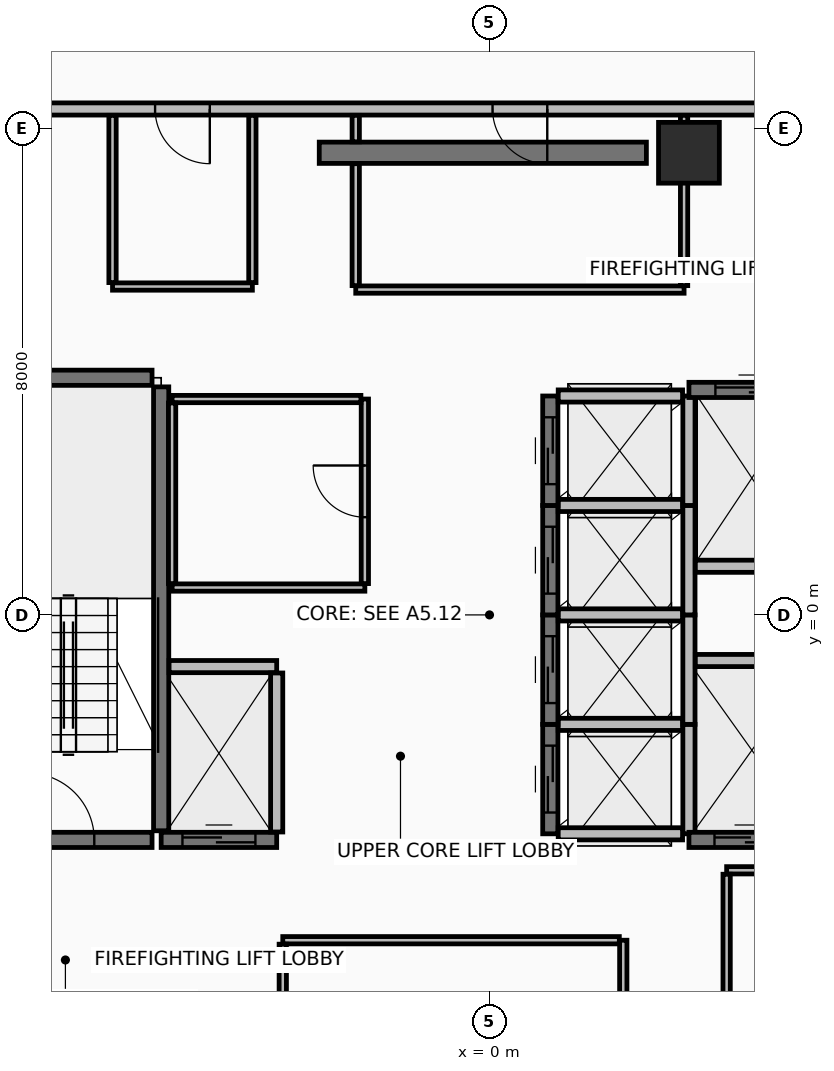
"""IFC4 building model, lengths in metres.
Left out: names, types, materials, properties, quantities, classifications, styles, units other than length and angle.
Written with IfcOpenShell. Run it as: python <this file> out.ifc"""

import sys

from ifc_helpers import new_model, si_unit, direction, frame, frame_2d, origin, origin_2d, place, context, subcontext, project, spatial, rectangle, extrude, element, fill, save


model = new_model("IFC4")
c1 = context("Model", 3, precision=1e-05, world=origin(), true_north=direction((0.0, 1.0)))
c2 = subcontext(c1, "Body", "Model", "MODEL_VIEW")
j1 = project(units=[si_unit("LENGTHUNIT", "METRE"), si_unit("PLANEANGLEUNIT", "RADIAN")], contexts=[c1])
p1 = place(None, origin())
s1 = spatial("IfcSite", under=j1, at=p1, CompositionType="ELEMENT")
p2 = place(p1, origin())
s2 = spatial("IfcBuilding", under=s1, at=p2, CompositionType="ELEMENT")
p3 = place(p2, frame((0.0, 0.0, 245.05)))
s3 = spatial("IfcBuildingStorey", under=s2, at=p3, CompositionType="ELEMENT", Elevation=245.05)
p4 = place(p3, frame((3.28, 7.6, 0.0), z_axis=(0.0, 0.0, 1.0), x_axis=(1.0, 0.0, 0.0)))
e1 = element("IfcColumn", 1, at=p4, inside=s3, PredefinedType="COLUMN", context=c2, shape_type="SweptSolid", body=[
    extrude(rectangle(XDim=1.0, YDim=1.0, at=origin_2d()), origin(), (0.0, 0.0, 1.0), 3.6),
])
p5 = place(p3, frame((-2.8, 7.6, 0.0), z_axis=(0.0, 0.0, 1.0), x_axis=(1.0, 0.0, 0.0)))
e2 = element("IfcWall", 2, at=p5, inside=s3, PredefinedType="SHEAR", context=c2, shape_type="SweptSolid", body=[
    extrude(rectangle(XDim=5.38, YDim=0.35, at=frame_2d((2.69, 0.0))), origin(), (0.0, 0.0, 1.0), 3.42),
])
p6 = place(p3, frame((9.62, 8.32, 0.0), z_axis=(0.0, 0.0, 1.0), x_axis=(-1.0, 0.0, 0.0)))
e3 = element("IfcWall", 3, at=p6, inside=s3, PredefinedType="PARTITIONING", context=c2, shape_type="SweptSolid", body=[
    extrude(rectangle(XDim=19.24, YDim=0.2, at=frame_2d((9.62, 0.0))), origin(), (0.0, 0.0, 1.0), 2.915),
])
p7 = place(p6, frame((8.67, 0.0, 0.0)))
e4 = element("IfcOpeningElement", 4, at=p7, cuts=e3, PredefinedType="OPENING", context=c2, shape_type="SweptSolid", body=[
    extrude(rectangle(XDim=0.9, YDim=2.1, at=frame_2d((0.45, 1.05))), frame((0.0, 0.11, 0.0), z_axis=(0.0, -1.0, 0.0), x_axis=(1.0, 0.0, 0.0)), (0.0, 0.0, 1.0), 0.22),
])
p8 = place(p6, frame((14.22, 0.0, 0.0)))
e5 = element("IfcOpeningElement", 5, at=p8, cuts=e3, PredefinedType="OPENING", context=c2, shape_type="SweptSolid", body=[
    extrude(rectangle(XDim=0.9, YDim=2.1, at=frame_2d((0.45, 1.05))), frame((0.0, 0.11, 0.0), z_axis=(0.0, -1.0, 0.0), x_axis=(1.0, 0.0, 0.0)), (0.0, 0.0, 1.0), 0.22),
])
p9 = place(p3, frame((-5.4, -3.55, 0.0), z_axis=(0.0, 0.0, 1.0), x_axis=(0.0, 1.0, 0.0)))
e6 = element("IfcWall", 6, at=p9, inside=s3, PredefinedType="SHEAR", context=c2, shape_type="SweptSolid", body=[
    extrude(rectangle(XDim=7.3, YDim=0.25, at=frame_2d((3.65, 0.0))), origin(), (0.0, 0.0, 1.0), 3.42),
])
p10 = place(p3, frame((-8.5, -3.7, 0.0), z_axis=(0.0, 0.0, 1.0), x_axis=(1.0, 0.0, 0.0)))
e7 = element("IfcWall", 7, at=p10, inside=s3, PredefinedType="SHEAR", context=c2, shape_type="SweptSolid", body=[
    extrude(rectangle(XDim=2.95, YDim=0.25, at=frame_2d((1.475, 0.0))), origin(), (0.0, 0.0, 1.0), 3.42),
])
p11 = place(p10, frame((0.9, 0.0, 0.0)))
e8 = element("IfcOpeningElement", 8, at=p11, cuts=e7, PredefinedType="OPENING", context=c2, shape_type="SweptSolid", body=[
    extrude(rectangle(XDim=1.1, YDim=2.15, at=frame_2d((0.55, 1.075))), frame((0.0, 0.135, 0.0), z_axis=(0.0, -1.0, 0.0), x_axis=(1.0, 0.0, 0.0)), (0.0, 0.0, 1.0), 0.27),
])
p12 = place(p3, frame((-8.5, 3.9, 0.0), z_axis=(0.0, 0.0, 1.0), x_axis=(1.0, 0.0, 0.0)))
e9 = element("IfcWall", 9, at=p12, inside=s3, PredefinedType="SHEAR", context=c2, shape_type="SweptSolid", body=[
    extrude(rectangle(XDim=2.95, YDim=0.25, at=frame_2d((1.475, 0.0))), origin(), (0.0, 0.0, 1.0), 3.42),
])
p13 = place(p3, frame((1.0, -3.6, 0.0), z_axis=(0.0, 0.0, 1.0), x_axis=(0.0, 1.0, 0.0)))
e10 = element("IfcWall", 10, at=p13, inside=s3, PredefinedType="SHEAR", context=c2, shape_type="SweptSolid", body=[
    extrude(rectangle(XDim=1.8, YDim=0.25, at=frame_2d((0.9, 0.0))), origin(), (0.0, 0.0, 1.0), 3.42),
])
p14 = place(p13, frame((0.35, 0.0, 0.0)))
e11 = element("IfcOpeningElement", 11, at=p14, cuts=e10, PredefinedType="OPENING", context=c2, shape_type="SweptSolid", body=[
    extrude(rectangle(XDim=1.1, YDim=2.2, at=frame_2d((0.55, 1.1))), frame((0.0, 0.135, 0.0), z_axis=(0.0, -1.0, 0.0), x_axis=(1.0, 0.0, 0.0)), (0.0, 0.0, 1.0), 0.27),
])
p15 = place(p3, frame((3.28, -3.6, 0.0), z_axis=(0.0, 0.0, 1.0), x_axis=(0.0, 1.0, 0.0)))
e12 = element("IfcWall", 12, at=p15, inside=s3, PredefinedType="PARTITIONING", context=c2, shape_type="SweptSolid", body=[
    extrude(rectangle(XDim=1.8, YDim=0.2, at=frame_2d((0.9, 0.0))), origin(), (0.0, 0.0, 1.0), 3.42),
])
for number, where, z_axis, x_axis in (
    (13, (1.13, -3.6, 0.0), (0.0, 0.0, 1.0), (1.0, 0.0, 0.0)),
    (14, (1.13, -1.8, 0.0), (0.0, 0.0, 1.0), (1.0, 0.0, 0.0)),
):
    element("IfcWall", number, at=place(p3, frame(where, z_axis=z_axis, x_axis=x_axis)), inside=s3, PredefinedType="PARTITIONING", context=c2, shape_type="SweptSolid", body=[
        extrude(rectangle(XDim=2.045, YDim=0.2, at=frame_2d((1.022, 0.0))), origin(), (0.0, 0.0, 1.0), 3.42),
    ])
p16 = place(p3, frame((1.0, -1.8, 0.0), z_axis=(0.0, 0.0, 1.0), x_axis=(0.0, 1.0, 0.0)))
e15 = element("IfcWall", 15, at=p16, inside=s3, PredefinedType="SHEAR", context=c2, shape_type="SweptSolid", body=[
    extrude(rectangle(XDim=1.8, YDim=0.25, at=frame_2d((0.9, 0.0))), origin(), (0.0, 0.0, 1.0), 3.42),
])
p17 = place(p16, frame((0.35, 0.0, 0.0)))
e16 = element("IfcOpeningElement", 16, at=p17, cuts=e15, PredefinedType="OPENING", context=c2, shape_type="SweptSolid", body=[
    extrude(rectangle(XDim=1.1, YDim=2.2, at=frame_2d((0.55, 1.1))), frame((0.0, 0.135, 0.0), z_axis=(0.0, -1.0, 0.0), x_axis=(1.0, 0.0, 0.0)), (0.0, 0.0, 1.0), 0.27),
])
p18 = place(p3, frame((3.28, -1.8, 0.0), z_axis=(0.0, 0.0, 1.0), x_axis=(0.0, 1.0, 0.0)))
e17 = element("IfcWall", 17, at=p18, inside=s3, PredefinedType="PARTITIONING", context=c2, shape_type="SweptSolid", body=[
    extrude(rectangle(XDim=1.8, YDim=0.2, at=frame_2d((0.9, 0.0))), origin(), (0.0, 0.0, 1.0), 3.42),
])
p19 = place(p3, frame((1.13, 0.0, 0.0), z_axis=(0.0, 0.0, 1.0), x_axis=(1.0, 0.0, 0.0)))
e18 = element("IfcWall", 18, at=p19, inside=s3, PredefinedType="PARTITIONING", context=c2, shape_type="SweptSolid", body=[
    extrude(rectangle(XDim=2.045, YDim=0.2, at=frame_2d((1.022, 0.0))), origin(), (0.0, 0.0, 1.0), 3.42),
])
p20 = place(p3, frame((1.0, 0.0, 0.0), z_axis=(0.0, 0.0, 1.0), x_axis=(0.0, 1.0, 0.0)))
e19 = element("IfcWall", 19, at=p20, inside=s3, PredefinedType="SHEAR", context=c2, shape_type="SweptSolid", body=[
    extrude(rectangle(XDim=1.8, YDim=0.25, at=frame_2d((0.9, 0.0))), origin(), (0.0, 0.0, 1.0), 3.42),
])
p21 = place(p20, frame((0.35, 0.0, 0.0)))
e20 = element("IfcOpeningElement", 20, at=p21, cuts=e19, PredefinedType="OPENING", context=c2, shape_type="SweptSolid", body=[
    extrude(rectangle(XDim=1.1, YDim=2.2, at=frame_2d((0.55, 1.1))), frame((0.0, 0.135, 0.0), z_axis=(0.0, -1.0, 0.0), x_axis=(1.0, 0.0, 0.0)), (0.0, 0.0, 1.0), 0.27),
])
p22 = place(p3, frame((3.28, 0.0, 0.0), z_axis=(0.0, 0.0, 1.0), x_axis=(0.0, 1.0, 0.0)))
e21 = element("IfcWall", 21, at=p22, inside=s3, PredefinedType="PARTITIONING", context=c2, shape_type="SweptSolid", body=[
    extrude(rectangle(XDim=1.8, YDim=0.2, at=frame_2d((0.9, 0.0))), origin(), (0.0, 0.0, 1.0), 3.42),
])
p23 = place(p3, frame((1.13, 1.8, 0.0), z_axis=(0.0, 0.0, 1.0), x_axis=(1.0, 0.0, 0.0)))
e22 = element("IfcWall", 22, at=p23, inside=s3, PredefinedType="PARTITIONING", context=c2, shape_type="SweptSolid", body=[
    extrude(rectangle(XDim=2.045, YDim=0.2, at=frame_2d((1.022, 0.0))), origin(), (0.0, 0.0, 1.0), 3.42),
])
p24 = place(p3, frame((1.0, 1.8, 0.0), z_axis=(0.0, 0.0, 1.0), x_axis=(0.0, 1.0, 0.0)))
e23 = element("IfcWall", 23, at=p24, inside=s3, PredefinedType="SHEAR", context=c2, shape_type="SweptSolid", body=[
    extrude(rectangle(XDim=1.8, YDim=0.25, at=frame_2d((0.9, 0.0))), origin(), (0.0, 0.0, 1.0), 3.42),
])
p25 = place(p24, frame((0.35, 0.0, 0.0)))
e24 = element("IfcOpeningElement", 24, at=p25, cuts=e23, PredefinedType="OPENING", context=c2, shape_type="SweptSolid", body=[
    extrude(rectangle(XDim=1.1, YDim=2.2, at=frame_2d((0.55, 1.1))), frame((0.0, 0.135, 0.0), z_axis=(0.0, -1.0, 0.0), x_axis=(1.0, 0.0, 0.0)), (0.0, 0.0, 1.0), 0.27),
])
p26 = place(p3, frame((3.28, 1.8, 0.0), z_axis=(0.0, 0.0, 1.0), x_axis=(0.0, 1.0, 0.0)))
e25 = element("IfcWall", 25, at=p26, inside=s3, PredefinedType="PARTITIONING", context=c2, shape_type="SweptSolid", body=[
    extrude(rectangle(XDim=1.8, YDim=0.2, at=frame_2d((0.9, 0.0))), origin(), (0.0, 0.0, 1.0), 3.42),
])
p27 = place(p3, frame((1.13, 3.6, 0.0), z_axis=(0.0, 0.0, 1.0), x_axis=(1.0, 0.0, 0.0)))
e26 = element("IfcWall", 26, at=p27, inside=s3, PredefinedType="PARTITIONING", context=c2, shape_type="SweptSolid", body=[
    extrude(rectangle(XDim=2.045, YDim=0.2, at=frame_2d((1.022, 0.0))), origin(), (0.0, 0.0, 1.0), 2.715),
])
p28 = place(p3, frame((-5.4, -3.7, 0.0), z_axis=(0.0, 0.0, 1.0), x_axis=(1.0, 0.0, 0.0)))
e27 = element("IfcWall", 27, at=p28, inside=s3, PredefinedType="SHEAR", context=c2, shape_type="SweptSolid", body=[
    extrude(rectangle(XDim=1.9, YDim=0.25, at=frame_2d((0.95, 0.0))), origin(), (0.0, 0.0, 1.0), 3.42),
])
p29 = place(p28, frame((0.35, 0.0, 0.0)))
e28 = element("IfcOpeningElement", 28, at=p29, cuts=e27, PredefinedType="OPENING", context=c2, shape_type="SweptSolid", body=[
    extrude(rectangle(XDim=1.2, YDim=2.2, at=frame_2d((0.6, 1.1))), frame((0.0, 0.135, 0.0), z_axis=(0.0, -1.0, 0.0), x_axis=(1.0, 0.0, 0.0)), (0.0, 0.0, 1.0), 0.27),
])
p30 = place(p3, frame((-5.27, -0.85, 0.0), z_axis=(0.0, 0.0, 1.0), x_axis=(1.0, 0.0, 0.0)))
e29 = element("IfcWall", 29, at=p30, inside=s3, PredefinedType="PARTITIONING", context=c2, shape_type="SweptSolid", body=[
    extrude(rectangle(XDim=1.77, YDim=0.2, at=frame_2d((0.885, 0.0))), origin(), (0.0, 0.0, 1.0), 3.42),
])
p31 = place(p3, frame((-3.5, -3.57, 0.0), z_axis=(0.0, 0.0, 1.0), x_axis=(0.0, 1.0, 0.0)))
e30 = element("IfcWall", 30, at=p31, inside=s3, PredefinedType="PARTITIONING", context=c2, shape_type="SweptSolid", body=[
    extrude(rectangle(XDim=2.615, YDim=0.2, at=frame_2d((1.308, 0.0))), origin(), (0.0, 0.0, 1.0), 3.42),
])
p32 = place(p3, frame((3.28, 3.7, 0.0), z_axis=(0.0, 0.0, 1.0), x_axis=(1.0, 0.0, 0.0)))
e31 = element("IfcWall", 31, at=p32, inside=s3, PredefinedType="SHEAR", context=c2, shape_type="SweptSolid", body=[
    extrude(rectangle(XDim=2.07, YDim=0.25, at=frame_2d((1.035, 0.0))), origin(), (0.0, 0.0, 1.0), 3.42),
])
p33 = place(p32, frame((0.435, 0.0, 0.0)))
e32 = element("IfcOpeningElement", 32, at=p33, cuts=e31, PredefinedType="OPENING", context=c2, shape_type="SweptSolid", body=[
    extrude(rectangle(XDim=1.2, YDim=2.2, at=frame_2d((0.6, 1.1))), frame((0.0, 0.135, 0.0), z_axis=(0.0, -1.0, 0.0), x_axis=(1.0, 0.0, 0.0)), (0.0, 0.0, 1.0), 0.27),
])
p34 = place(p3, frame((3.385, 0.8, 0.0), z_axis=(0.0, 0.0, 1.0), x_axis=(1.0, 0.0, 0.0)))
e33 = element("IfcWall", 33, at=p34, inside=s3, PredefinedType="PARTITIONING", context=c2, shape_type="SweptSolid", body=[
    extrude(rectangle(XDim=1.835, YDim=0.2, at=frame_2d((0.917, 0.0))), origin(), (0.0, 0.0, 1.0), 3.42),
])
p35 = place(p3, frame((3.28, -3.7, 0.0), z_axis=(0.0, 0.0, 1.0), x_axis=(1.0, 0.0, 0.0)))
e34 = element("IfcWall", 34, at=p35, inside=s3, PredefinedType="SHEAR", context=c2, shape_type="SweptSolid", body=[
    extrude(rectangle(XDim=1.94, YDim=0.25, at=frame_2d((0.97, 0.0))), origin(), (0.0, 0.0, 1.0), 3.42),
])
p36 = place(p35, frame((0.42, 0.0, 0.0)))
e35 = element("IfcOpeningElement", 35, at=p36, cuts=e34, PredefinedType="OPENING", context=c2, shape_type="SweptSolid", body=[
    extrude(rectangle(XDim=1.1, YDim=2.2, at=frame_2d((0.55, 1.1))), frame((0.0, 0.135, 0.0), z_axis=(0.0, -1.0, 0.0), x_axis=(1.0, 0.0, 0.0)), (0.0, 0.0, 1.0), 0.27),
])
p37 = place(p3, frame((3.385, -0.75, 0.0), z_axis=(0.0, 0.0, 1.0), x_axis=(1.0, 0.0, 0.0)))
e36 = element("IfcWall", 36, at=p37, inside=s3, PredefinedType="PARTITIONING", context=c2, shape_type="SweptSolid", body=[
    extrude(rectangle(XDim=1.835, YDim=0.2, at=frame_2d((0.917, 0.0))), origin(), (0.0, 0.0, 1.0), 3.42),
])
p38 = place(p3, frame((-5.22, 0.45, 0.0), z_axis=(0.0, 0.0, 1.0), x_axis=(1.0, 0.0, 0.0)))
e37 = element("IfcWall", 37, at=p38, inside=s3, PredefinedType="PARTITIONING", context=c2, shape_type="SweptSolid", body=[
    extrude(rectangle(XDim=3.17, YDim=0.12, at=frame_2d((1.585, 0.0))), origin(), (0.0, 0.0, 1.0), 3.42),
])
p39 = place(p3, frame((-2.05, 0.515, 0.0), z_axis=(0.0, 0.0, 1.0), x_axis=(0.0, 1.0, 0.0)))
e38 = element("IfcWall", 38, at=p39, inside=s3, PredefinedType="PARTITIONING", context=c2, shape_type="SweptSolid", body=[
    extrude(rectangle(XDim=3.035, YDim=0.12, at=frame_2d((1.518, 0.0))), origin(), (0.0, 0.0, 1.0), 3.42),
])
p40 = place(p39, frame((1.092, 0.0, 0.0)))
e39 = element("IfcOpeningElement", 39, at=p40, cuts=e38, PredefinedType="OPENING", context=c2, shape_type="SweptSolid", body=[
    extrude(rectangle(XDim=0.85, YDim=2.1, at=frame_2d((0.425, 1.05))), frame((0.0, 0.07, 0.0), z_axis=(0.0, -1.0, 0.0), x_axis=(1.0, 0.0, 0.0)), (0.0, 0.0, 1.0), 0.14),
])
p41 = place(p3, frame((-2.115, 3.55, 0.0), z_axis=(0.0, 0.0, 1.0), x_axis=(-1.0, 0.0, 0.0)))
e40 = element("IfcWall", 40, at=p41, inside=s3, PredefinedType="PARTITIONING", context=c2, shape_type="SweptSolid", body=[
    extrude(rectangle(XDim=3.105, YDim=0.12, at=frame_2d((1.552, 0.0))), origin(), (0.0, 0.0, 1.0), 3.42),
])
p42 = place(p3, frame((-5.22, 3.485, 0.0), z_axis=(0.0, 0.0, 1.0), x_axis=(0.0, -1.0, 0.0)))
e41 = element("IfcWall", 41, at=p42, inside=s3, PredefinedType="PARTITIONING", context=c2, shape_type="SweptSolid", body=[
    extrude(rectangle(XDim=2.97, YDim=0.12, at=frame_2d((1.485, 0.0))), origin(), (0.0, 0.0, 1.0), 3.42),
])
p43 = place(p3, frame((2.2, -7.42, 0.0), z_axis=(0.0, 0.0, 1.0), x_axis=(0.0, 1.0, 0.0)))
e42 = element("IfcWall", 42, at=p43, inside=s3, PredefinedType="PARTITIONING", context=c2, shape_type="SweptSolid", body=[
    extrude(rectangle(XDim=2.07, YDim=0.12, at=frame_2d((1.035, 0.0))), origin(), (0.0, 0.0, 1.0), 2.715),
])
p44 = place(p3, frame((2.135, -5.35, 0.0), z_axis=(0.0, 0.0, 1.0), x_axis=(-1.0, 0.0, 0.0)))
e43 = element("IfcWall", 43, at=p44, inside=s3, PredefinedType="PARTITIONING", context=c2, shape_type="SweptSolid", body=[
    extrude(rectangle(XDim=5.535, YDim=0.12, at=frame_2d((2.768, 0.0))), origin(), (0.0, 0.0, 1.0), 2.715),
])
p45 = place(p3, frame((-3.4, -5.415, 0.0), z_axis=(0.0, 0.0, 1.0), x_axis=(0.0, -1.0, 0.0)))
e44 = element("IfcWall", 44, at=p45, inside=s3, PredefinedType="PARTITIONING", context=c2, shape_type="SweptSolid", body=[
    extrude(rectangle(XDim=2.8, YDim=0.12, at=frame_2d((1.4, 0.0))), origin(), (0.0, 0.0, 1.0), 2.715),
])
p46 = place(p3, frame((-2.2, 5.35, 0.0), z_axis=(0.0, 0.0, 1.0), x_axis=(1.0, 0.0, 0.0)))
e45 = element("IfcWall", 45, at=p46, inside=s3, PredefinedType="PARTITIONING", context=c2, shape_type="SweptSolid", body=[
    extrude(rectangle(XDim=5.4, YDim=0.12, at=frame_2d((2.7, 0.0))), origin(), (0.0, 0.0, 1.0), 2.715),
])
p47 = place(p3, frame((3.2, 5.415, 0.0), z_axis=(0.0, 0.0, 1.0), x_axis=(0.0, 1.0, 0.0)))
e46 = element("IfcWall", 46, at=p47, inside=s3, PredefinedType="PARTITIONING", context=c2, shape_type="SweptSolid", body=[
    extrude(rectangle(XDim=2.8, YDim=0.12, at=frame_2d((1.4, 0.0))), origin(), (0.0, 0.0, 1.0), 2.715),
])
p48 = place(p3, frame((-2.2, 8.215, 0.0), z_axis=(0.0, 0.0, 1.0), x_axis=(0.0, -1.0, 0.0)))
e47 = element("IfcWall", 47, at=p48, inside=s3, PredefinedType="PARTITIONING", context=c2, shape_type="SweptSolid", body=[
    extrude(rectangle(XDim=0.435, YDim=0.12, at=frame_2d((0.218, 0.0))), origin(), (0.0, 0.0, 1.0), 2.715),
])
p49 = place(p3, frame((-2.2, 7.42, 0.0), z_axis=(0.0, 0.0, 1.0), x_axis=(0.0, -1.0, 0.0)))
e48 = element("IfcWall", 48, at=p49, inside=s3, PredefinedType="PARTITIONING", context=c2, shape_type="SweptSolid", body=[
    extrude(rectangle(XDim=2.005, YDim=0.12, at=frame_2d((1.002, 0.0))), origin(), (0.0, 0.0, 1.0), 2.715),
])
p50 = place(p3, frame((-6.2, 5.4, 0.0), z_axis=(0.0, 0.0, 1.0), x_axis=(1.0, 0.0, 0.0)))
e49 = element("IfcWall", 49, at=p50, inside=s3, PredefinedType="PARTITIONING", context=c2, shape_type="SweptSolid", body=[
    extrude(rectangle(XDim=2.3, YDim=0.12, at=frame_2d((1.15, 0.0))), origin(), (0.0, 0.0, 1.0), 3.42),
])
for number, where, z_axis, x_axis in (
    (50, (-3.9, 5.465, 0.0), (0.0, 0.0, 1.0), (0.0, 1.0, 0.0)),
    (51, (-6.2, 8.215, 0.0), (0.0, 0.0, 1.0), (0.0, -1.0, 0.0)),
):
    element("IfcWall", number, at=place(p3, frame(where, z_axis=z_axis, x_axis=x_axis)), inside=s3, PredefinedType="PARTITIONING", context=c2, shape_type="SweptSolid", body=[
        extrude(rectangle(XDim=2.75, YDim=0.12, at=frame_2d((1.375, 0.0))), origin(), (0.0, 0.0, 1.0), 2.715),
    ])
p51 = place(p3, frame((7.735, -4.2, 0.0), z_axis=(0.0, 0.0, 1.0), x_axis=(-1.0, 0.0, 0.0)))
e52 = element("IfcWall", 52, at=p51, inside=s3, PredefinedType="PARTITIONING", context=c2, shape_type="SweptSolid", body=[
    extrude(rectangle(XDim=3.835, YDim=0.12, at=frame_2d((1.917, 0.0))), origin(), (0.0, 0.0, 1.0), 3.42),
])
p52 = place(p3, frame((3.9, -4.265, 0.0), z_axis=(0.0, 0.0, 1.0), x_axis=(0.0, -1.0, 0.0)))
e53 = element("IfcWall", 53, at=p52, inside=s3, PredefinedType="PARTITIONING", context=c2, shape_type="SweptSolid", body=[
    extrude(rectangle(XDim=3.95, YDim=0.12, at=frame_2d((1.975, 0.0))), origin(), (0.0, 0.0, 1.0), 2.715),
])
p53 = place(p11, origin())
e54 = element("IfcDoor", 54, at=p53, inside=s3, OperationType="SINGLE_SWING_LEFT", PredefinedType="DOOR", context=c2, shape_type="SweptSolid", body=[
    extrude(rectangle(XDim=1.1, YDim=2.15, at=frame_2d((0.55, 1.075))), frame((0.0, 0.025, 0.0), z_axis=(0.0, -1.0, 0.0), x_axis=(1.0, 0.0, 0.0)), (0.0, 0.0, 1.0), 0.05),
])
fill(e8, e54)
p54 = place(p14, origin())
e55 = element("IfcDoor", 55, at=p54, inside=s3, OperationType="SLIDING_TO_LEFT", PredefinedType="DOOR", context=c2, shape_type="SweptSolid", body=[
    extrude(rectangle(XDim=1.1, YDim=2.2, at=frame_2d((0.55, 1.1))), frame((0.0, 0.025, 0.0), z_axis=(0.0, -1.0, 0.0), x_axis=(1.0, 0.0, 0.0)), (0.0, 0.0, 1.0), 0.05),
])
fill(e11, e55)
p55 = place(p17, origin())
e56 = element("IfcDoor", 56, at=p55, inside=s3, OperationType="SLIDING_TO_LEFT", PredefinedType="DOOR", context=c2, shape_type="SweptSolid", body=[
    extrude(rectangle(XDim=1.1, YDim=2.2, at=frame_2d((0.55, 1.1))), frame((0.0, 0.025, 0.0), z_axis=(0.0, -1.0, 0.0), x_axis=(1.0, 0.0, 0.0)), (0.0, 0.0, 1.0), 0.05),
])
fill(e16, e56)
p56 = place(p21, origin())
e57 = element("IfcDoor", 57, at=p56, inside=s3, OperationType="SLIDING_TO_LEFT", PredefinedType="DOOR", context=c2, shape_type="SweptSolid", body=[
    extrude(rectangle(XDim=1.1, YDim=2.2, at=frame_2d((0.55, 1.1))), frame((0.0, 0.025, 0.0), z_axis=(0.0, -1.0, 0.0), x_axis=(1.0, 0.0, 0.0)), (0.0, 0.0, 1.0), 0.05),
])
fill(e20, e57)
p57 = place(p25, origin())
e58 = element("IfcDoor", 58, at=p57, inside=s3, OperationType="SLIDING_TO_LEFT", PredefinedType="DOOR", context=c2, shape_type="SweptSolid", body=[
    extrude(rectangle(XDim=1.1, YDim=2.2, at=frame_2d((0.55, 1.1))), frame((0.0, 0.025, 0.0), z_axis=(0.0, -1.0, 0.0), x_axis=(1.0, 0.0, 0.0)), (0.0, 0.0, 1.0), 0.05),
])
fill(e24, e58)
p58 = place(p29, origin())
e59 = element("IfcDoor", 59, at=p58, inside=s3, OperationType="SLIDING_TO_RIGHT", PredefinedType="DOOR", context=c2, shape_type="SweptSolid", body=[
    extrude(rectangle(XDim=1.2, YDim=2.2, at=frame_2d((0.6, 1.1))), frame((0.0, 0.025, 0.0), z_axis=(0.0, -1.0, 0.0), x_axis=(1.0, 0.0, 0.0)), (0.0, 0.0, 1.0), 0.05),
])
fill(e28, e59)
p59 = place(p33, origin())
e60 = element("IfcDoor", 60, at=p59, inside=s3, OperationType="SLIDING_TO_RIGHT", PredefinedType="DOOR", context=c2, shape_type="SweptSolid", body=[
    extrude(rectangle(XDim=1.2, YDim=2.2, at=frame_2d((0.6, 1.1))), frame((0.0, 0.025, 0.0), z_axis=(0.0, -1.0, 0.0), x_axis=(1.0, 0.0, 0.0)), (0.0, 0.0, 1.0), 0.05),
])
fill(e32, e60)
p60 = place(p36, origin())
e61 = element("IfcDoor", 61, at=p60, inside=s3, OperationType="SLIDING_TO_LEFT", PredefinedType="DOOR", context=c2, shape_type="SweptSolid", body=[
    extrude(rectangle(XDim=1.1, YDim=2.2, at=frame_2d((0.55, 1.1))), frame((0.0, 0.025, 0.0), z_axis=(0.0, -1.0, 0.0), x_axis=(1.0, 0.0, 0.0)), (0.0, 0.0, 1.0), 0.05),
])
fill(e35, e61)
p61 = place(p40, frame((0.85, 0.0, 0.0), z_axis=(0.0, 0.0, 1.0), x_axis=(-1.0, 0.0, 0.0)))
e62 = element("IfcDoor", 62, at=p61, inside=s3, OperationType="SINGLE_SWING_RIGHT", PredefinedType="DOOR", context=c2, shape_type="SweptSolid", body=[
    extrude(rectangle(XDim=0.85, YDim=2.1, at=frame_2d((0.425, 1.05))), frame((0.0, 0.025, 0.0), z_axis=(0.0, -1.0, 0.0), x_axis=(1.0, 0.0, 0.0)), (0.0, 0.0, 1.0), 0.05),
])
fill(e39, e62)
p62 = place(p7, origin())
e63 = element("IfcDoor", 63, at=p62, inside=s3, OperationType="SINGLE_SWING_LEFT", PredefinedType="DOOR", context=c2, shape_type="SweptSolid", body=[
    extrude(rectangle(XDim=0.9, YDim=2.1, at=frame_2d((0.45, 1.05))), frame((0.0, 0.025, 0.0), z_axis=(0.0, -1.0, 0.0), x_axis=(1.0, 0.0, 0.0)), (0.0, 0.0, 1.0), 0.05),
])
fill(e4, e63)
p63 = place(p8, origin())
e64 = element("IfcDoor", 64, at=p63, inside=s3, OperationType="SINGLE_SWING_LEFT", PredefinedType="DOOR", context=c2, shape_type="SweptSolid", body=[
    extrude(rectangle(XDim=0.9, YDim=2.1, at=frame_2d((0.45, 1.05))), frame((0.0, 0.025, 0.0), z_axis=(0.0, -1.0, 0.0), x_axis=(1.0, 0.0, 0.0)), (0.0, 0.0, 1.0), 0.05),
])
fill(e5, e64)
save(model, sys.argv[1])
